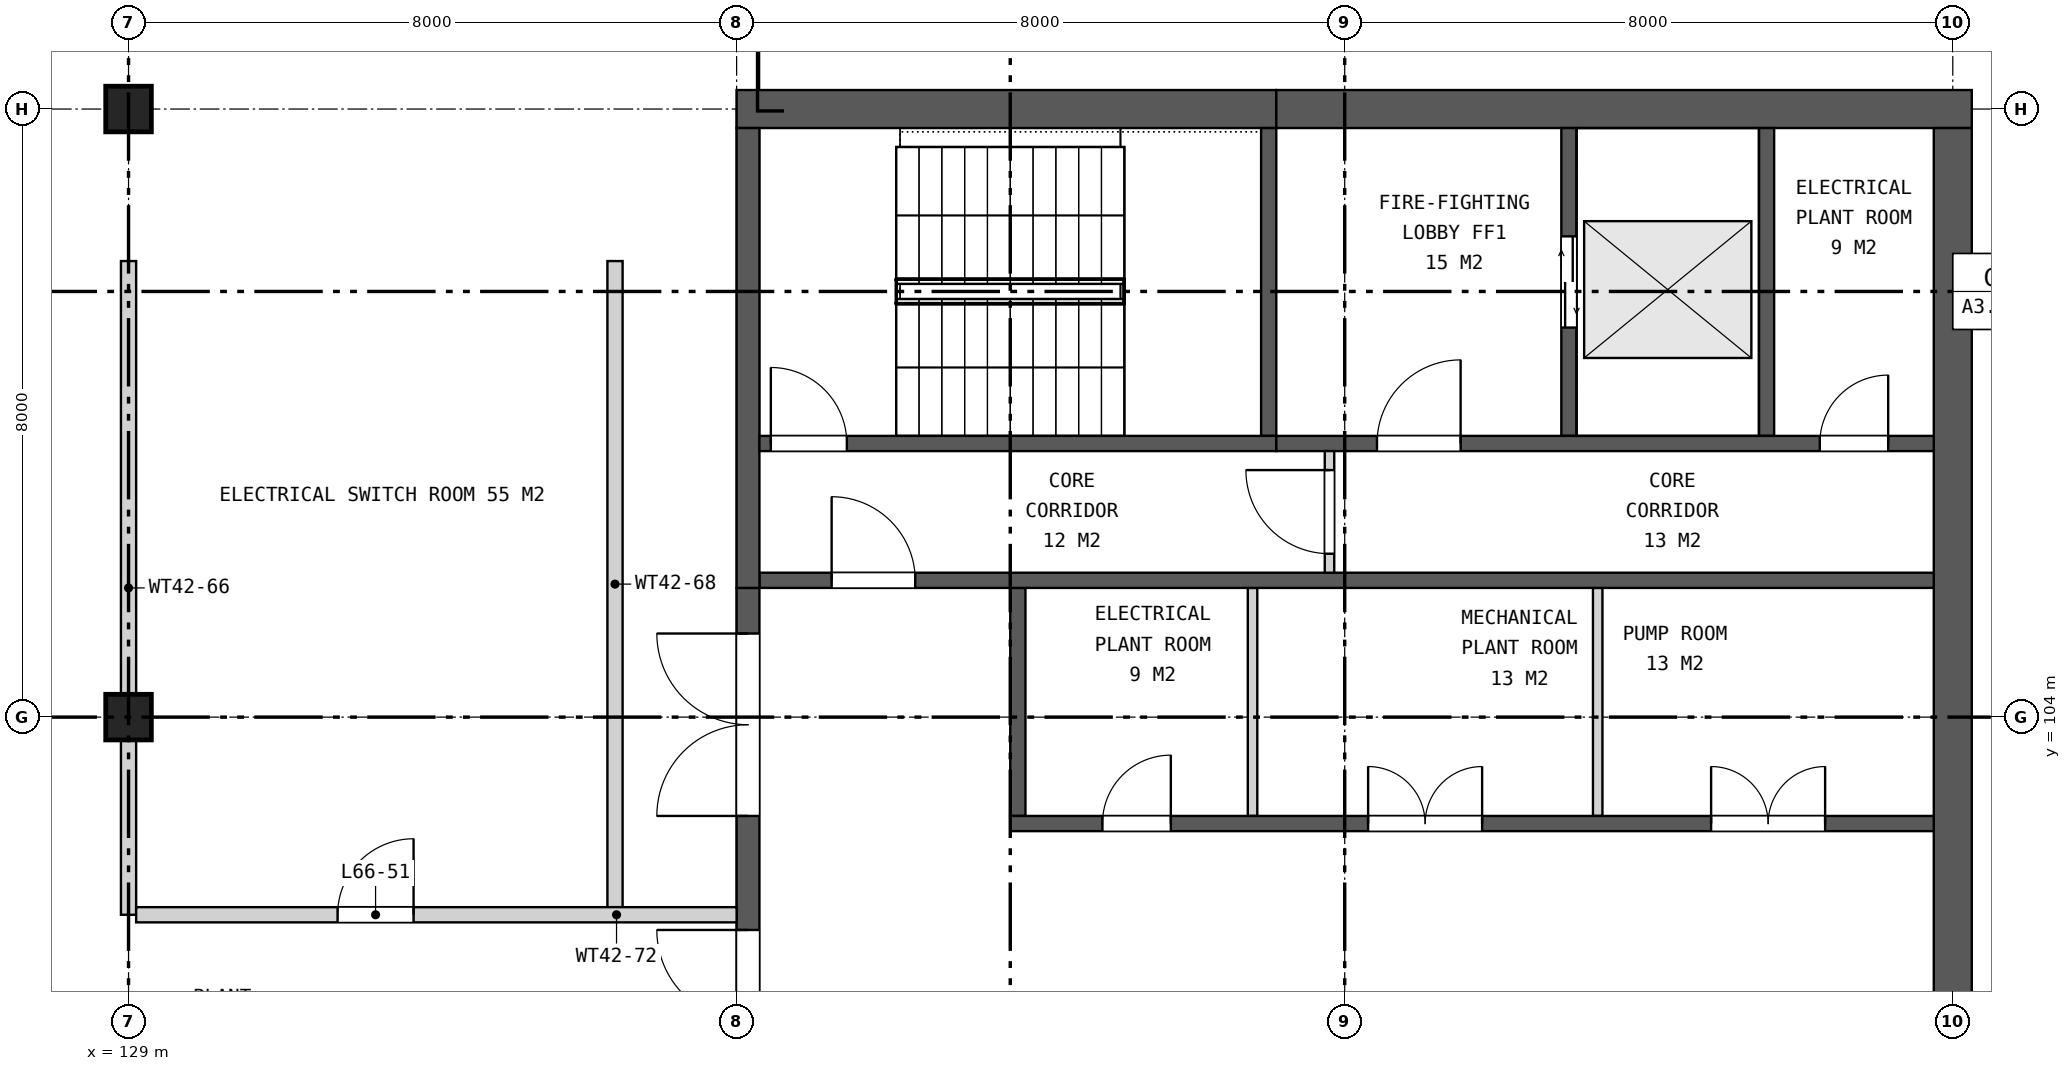
"""IFC4 building model, lengths in metres.
Left out: names, types, materials, properties, quantities, classifications, styles, units other than length and angle.
Written with IfcOpenShell. Run it as: python <this file> out.ifc"""

import sys

from ifc_helpers import new_model, si_unit, direction, frame, frame_2d, origin, origin_2d, place, context, subcontext, project, spatial, rectangle, extrude, element, fill, save


model = new_model("IFC4")
c1 = context("Model", 3, precision=1e-05, world=origin(), true_north=direction((0.0, 1.0)))
c2 = subcontext(c1, "Body", "Model", "MODEL_VIEW")
j1 = project(units=[si_unit("LENGTHUNIT", "METRE"), si_unit("PLANEANGLEUNIT", "RADIAN")], contexts=[c1])
p1 = place(None, origin())
s1 = spatial("IfcSite", under=j1, at=p1, CompositionType="ELEMENT")
p2 = place(p1, origin())
s2 = spatial("IfcBuilding", under=s1, at=p2, CompositionType="ELEMENT")
p3 = place(p2, frame((0.0, 0.0, 303.9)))
s3 = spatial("IfcBuildingStorey", under=s2, at=p3, CompositionType="ELEMENT", Elevation=303.9)
for number, where, z_axis, x_axis in (
    (1, (129.0, 104.0, 0.0), (0.0, 0.0, 1.0), (1.0, 0.0, 0.0)),
    (2, (129.0, 112.0, 0.0), (0.0, 0.0, 1.0), (1.0, 0.0, 0.0)),
):
    element("IfcColumn", number, at=place(p3, frame(where, z_axis=z_axis, x_axis=x_axis)), inside=s3, PredefinedType="COLUMN", context=c2, shape_type="SweptSolid", body=[
        extrude(rectangle(XDim=0.6, YDim=0.6, at=origin_2d()), origin(), (0.0, 0.0, 1.0), 7.4),
    ])
p4 = place(p3, frame((137.0, 112.0, 0.0), z_axis=(0.0, 0.0, 1.0), x_axis=(1.0, 0.0, 0.0)))
e3 = element("IfcWall", 3, at=p4, inside=s3, PredefinedType="SHEAR", context=c2, shape_type="SweptSolid", body=[
    extrude(rectangle(XDim=7.1, YDim=0.5, at=frame_2d((3.55, 0.0))), origin(), (0.0, 0.0, 1.0), 7.4),
])
p5 = place(p3, frame((144.1, 112.0, 0.0), z_axis=(0.0, 0.0, 1.0), x_axis=(1.0, 0.0, 0.0)))
e4 = element("IfcWall", 4, at=p5, inside=s3, PredefinedType="SHEAR", context=c2, shape_type="SweptSolid", body=[
    extrude(rectangle(XDim=9.15, YDim=0.5, at=frame_2d((4.575, 0.0))), origin(), (0.0, 0.0, 1.0), 7.4),
])
p6 = place(p3, frame((153.0, 88.25, 0.0), z_axis=(0.0, 0.0, 1.0), x_axis=(0.0, 1.0, 0.0)))
e5 = element("IfcWall", 5, at=p6, inside=s3, PredefinedType="SHEAR", context=c2, shape_type="SweptSolid", body=[
    extrude(rectangle(XDim=23.5, YDim=0.5, at=frame_2d((11.75, 0.0))), origin(), (0.0, 0.0, 1.0), 7.4),
])
p7 = place(p3, frame((137.15, 94.3, 0.0), z_axis=(0.0, 0.0, 1.0), x_axis=(0.0, 1.0, 0.0)))
e6 = element("IfcWall", 6, at=p7, inside=s3, PredefinedType="SHEAR", context=c2, shape_type="SweptSolid", body=[
    extrude(rectangle(XDim=11.4, YDim=0.3, at=frame_2d((5.7, 0.0))), origin(), (0.0, 0.0, 1.0), 7.4),
])
p8 = place(p7, frame((0.6, 0.0, 0.0)))
e7 = element("IfcOpeningElement", 7, at=p8, cuts=e6, PredefinedType="OPENING", context=c2, shape_type="SweptSolid", body=[
    extrude(rectangle(XDim=2.4, YDim=2.4, at=frame_2d((1.2, 1.2))), frame((0.0, 0.16, 0.0), z_axis=(0.0, -1.0, 0.0), x_axis=(1.0, 0.0, 0.0)), (0.0, 0.0, 1.0), 0.32),
])
p9 = place(p7, frame((4.5, 0.0, 0.0)))
e8 = element("IfcOpeningElement", 8, at=p9, cuts=e6, PredefinedType="OPENING", context=c2, shape_type="SweptSolid", body=[
    extrude(rectangle(XDim=2.4, YDim=2.4, at=frame_2d((1.2, 1.2))), frame((0.0, 0.16, 0.0), z_axis=(0.0, -1.0, 0.0), x_axis=(1.0, 0.0, 0.0)), (0.0, 0.0, 1.0), 0.32),
])
p10 = place(p7, frame((8.4, 0.0, 0.0)))
e9 = element("IfcOpeningElement", 9, at=p10, cuts=e6, PredefinedType="OPENING", context=c2, shape_type="SweptSolid", body=[
    extrude(rectangle(XDim=2.4, YDim=2.4, at=frame_2d((1.2, 1.2))), frame((0.0, 0.16, 0.0), z_axis=(0.0, -1.0, 0.0), x_axis=(1.0, 0.0, 0.0)), (0.0, 0.0, 1.0), 0.32),
])
p11 = place(p3, frame((140.7, 102.7, 0.0), z_axis=(0.0, 0.0, 1.0), x_axis=(0.0, 1.0, 0.0)))
e10 = element("IfcWall", 10, at=p11, inside=s3, PredefinedType="SHEAR", context=c2, shape_type="SweptSolid", body=[
    extrude(rectangle(XDim=3.0, YDim=0.2, at=frame_2d((1.5, 0.0))), origin(), (0.0, 0.0, 1.0), 7.4),
])
for number, where, z_axis, x_axis in (
    (11, (143.788, 102.7, 0.0), (0.0, 0.0, 1.0), (0.0, 1.0, 0.0)),
    (12, (148.329, 102.7, 0.0), (0.0, 0.0, 1.0), (0.0, 1.0, 0.0)),
):
    element("IfcWall", number, at=place(p3, frame(where, z_axis=z_axis, x_axis=x_axis)), inside=s3, PredefinedType="PARTITIONING", context=c2, shape_type="SweptSolid", body=[
        extrude(rectangle(XDim=3.0, YDim=0.125, at=frame_2d((1.5, 0.0))), origin(), (0.0, 0.0, 1.0), 7.4),
    ])
p12 = place(p3, frame((140.6, 102.6, 0.0), z_axis=(0.0, 0.0, 1.0), x_axis=(1.0, 0.0, 0.0)))
e13 = element("IfcWall", 13, at=p12, inside=s3, PredefinedType="SHEAR", context=c2, shape_type="SweptSolid", body=[
    extrude(rectangle(XDim=12.15, YDim=0.2, at=frame_2d((6.075, 0.0))), origin(), (0.0, 0.0, 1.0), 7.4),
])
p13 = place(p12, frame((1.212, 0.0, 0.0)))
e14 = element("IfcOpeningElement", 14, at=p13, cuts=e13, PredefinedType="OPENING", context=c2, shape_type="SweptSolid", body=[
    extrude(rectangle(XDim=0.9, YDim=2.1, at=frame_2d((0.45, 1.05))), frame((0.0, 0.11, 0.0), z_axis=(0.0, -1.0, 0.0), x_axis=(1.0, 0.0, 0.0)), (0.0, 0.0, 1.0), 0.22),
])
p14 = place(p12, frame((4.708, 0.0, 0.0)))
e15 = element("IfcOpeningElement", 15, at=p14, cuts=e13, PredefinedType="OPENING", context=c2, shape_type="SweptSolid", body=[
    extrude(rectangle(XDim=1.5, YDim=2.1, at=frame_2d((0.75, 1.05))), frame((0.0, 0.11, 0.0), z_axis=(0.0, -1.0, 0.0), x_axis=(1.0, 0.0, 0.0)), (0.0, 0.0, 1.0), 0.22),
])
p15 = place(p12, frame((9.22, 0.0, 0.0)))
e16 = element("IfcOpeningElement", 16, at=p15, cuts=e13, PredefinedType="OPENING", context=c2, shape_type="SweptSolid", body=[
    extrude(rectangle(XDim=1.5, YDim=2.1, at=frame_2d((0.75, 1.05))), frame((0.0, 0.11, 0.0), z_axis=(0.0, -1.0, 0.0), x_axis=(1.0, 0.0, 0.0)), (0.0, 0.0, 1.0), 0.22),
])
p16 = place(p3, frame((137.3, 105.8, 0.0), z_axis=(0.0, 0.0, 1.0), x_axis=(1.0, 0.0, 0.0)))
e17 = element("IfcWall", 17, at=p16, inside=s3, PredefinedType="SHEAR", context=c2, shape_type="SweptSolid", body=[
    extrude(rectangle(XDim=15.45, YDim=0.2, at=frame_2d((7.725, 0.0))), origin(), (0.0, 0.0, 1.0), 7.4),
])
p17 = place(p16, frame((0.95, 0.0, 0.0)))
e18 = element("IfcOpeningElement", 18, at=p17, cuts=e17, PredefinedType="OPENING", context=c2, shape_type="SweptSolid", body=[
    extrude(rectangle(XDim=1.1, YDim=2.1, at=frame_2d((0.55, 1.05))), frame((0.0, 0.11, 0.0), z_axis=(0.0, -1.0, 0.0), x_axis=(1.0, 0.0, 0.0)), (0.0, 0.0, 1.0), 0.22),
])
p18 = place(p3, frame((137.15, 105.7, 0.0), z_axis=(0.0, 0.0, 1.0), x_axis=(0.0, 1.0, 0.0)))
e19 = element("IfcWall", 19, at=p18, inside=s3, PredefinedType="SHEAR", context=c2, shape_type="SweptSolid", body=[
    extrude(rectangle(XDim=6.05, YDim=0.3, at=frame_2d((3.025, 0.0))), origin(), (0.0, 0.0, 1.0), 7.4),
])
p19 = place(p3, frame((144.0, 107.7, 0.0), z_axis=(0.0, 0.0, 1.0), x_axis=(0.0, 1.0, 0.0)))
e20 = element("IfcWall", 20, at=p19, inside=s3, PredefinedType="SHEAR", context=c2, shape_type="SweptSolid", body=[
    extrude(rectangle(XDim=4.05, YDim=0.2, at=frame_2d((2.025, 0.0))), origin(), (0.0, 0.0, 1.0), 7.4),
])
p20 = place(p3, frame((147.95, 107.7, 0.0), z_axis=(0.0, 0.0, 1.0), x_axis=(0.0, 1.0, 0.0)))
e21 = element("IfcWall", 21, at=p20, inside=s3, PredefinedType="SHEAR", context=c2, shape_type="SweptSolid", body=[
    extrude(rectangle(XDim=4.05, YDim=0.2, at=frame_2d((2.025, 0.0))), origin(), (0.0, 0.0, 1.0), 7.4),
])
p21 = place(p20, frame((1.425, 0.0, 0.0)))
e22 = element("IfcOpeningElement", 22, at=p21, cuts=e21, PredefinedType="OPENING", context=c2, shape_type="SweptSolid", body=[
    extrude(rectangle(XDim=1.2, YDim=2.1, at=frame_2d((0.6, 1.05))), frame((0.0, 0.11, 0.0), z_axis=(0.0, -1.0, 0.0), x_axis=(1.0, 0.0, 0.0)), (0.0, 0.0, 1.0), 0.22),
])
p22 = place(p3, frame((150.55, 107.7, 0.0), z_axis=(0.0, 0.0, 1.0), x_axis=(0.0, 1.0, 0.0)))
e23 = element("IfcWall", 23, at=p22, inside=s3, PredefinedType="SHEAR", context=c2, shape_type="SweptSolid", body=[
    extrude(rectangle(XDim=4.05, YDim=0.2, at=frame_2d((2.025, 0.0))), origin(), (0.0, 0.0, 1.0), 7.4),
])
p23 = place(p3, frame((137.3, 107.6, 0.0), z_axis=(0.0, 0.0, 1.0), x_axis=(1.0, 0.0, 0.0)))
e24 = element("IfcWall", 24, at=p23, inside=s3, PredefinedType="SHEAR", context=c2, shape_type="SweptSolid", body=[
    extrude(rectangle(XDim=6.8, YDim=0.2, at=frame_2d((3.4, 0.0))), origin(), (0.0, 0.0, 1.0), 7.4),
])
p24 = place(p23, frame((0.15, 0.0, 0.0)))
e25 = element("IfcOpeningElement", 25, at=p24, cuts=e24, PredefinedType="OPENING", context=c2, shape_type="SweptSolid", body=[
    extrude(rectangle(XDim=1.0, YDim=2.1, at=frame_2d((0.5, 1.05))), frame((0.0, 0.11, 0.0), z_axis=(0.0, -1.0, 0.0), x_axis=(1.0, 0.0, 0.0)), (0.0, 0.0, 1.0), 0.22),
])
p25 = place(p3, frame((144.1, 107.6, 0.0), z_axis=(0.0, 0.0, 1.0), x_axis=(1.0, 0.0, 0.0)))
e26 = element("IfcWall", 26, at=p25, inside=s3, PredefinedType="SHEAR", context=c2, shape_type="SweptSolid", body=[
    extrude(rectangle(XDim=8.65, YDim=0.2, at=frame_2d((4.325, 0.0))), origin(), (0.0, 0.0, 1.0), 7.4),
])
p26 = place(p25, frame((1.325, 0.0, 0.0)))
e27 = element("IfcOpeningElement", 27, at=p26, cuts=e26, PredefinedType="OPENING", context=c2, shape_type="SweptSolid", body=[
    extrude(rectangle(XDim=1.1, YDim=2.1, at=frame_2d((0.55, 1.05))), frame((0.0, 0.11, 0.0), z_axis=(0.0, -1.0, 0.0), x_axis=(1.0, 0.0, 0.0)), (0.0, 0.0, 1.0), 0.22),
])
p27 = place(p25, frame((7.15, 0.0, 0.0)))
e28 = element("IfcOpeningElement", 28, at=p27, cuts=e26, PredefinedType="OPENING", context=c2, shape_type="SweptSolid", body=[
    extrude(rectangle(XDim=0.9, YDim=2.1, at=frame_2d((0.45, 1.05))), frame((0.0, 0.11, 0.0), z_axis=(0.0, -1.0, 0.0), x_axis=(1.0, 0.0, 0.0)), (0.0, 0.0, 1.0), 0.22),
])
p28 = place(p3, frame((144.8, 105.9, 0.0), z_axis=(0.0, 0.0, 1.0), x_axis=(0.0, 1.0, 0.0)))
e29 = element("IfcWall", 29, at=p28, inside=s3, PredefinedType="PARTITIONING", context=c2, shape_type="SweptSolid", body=[
    extrude(rectangle(XDim=1.6, YDim=0.125, at=frame_2d((0.8, 0.0))), origin(), (0.0, 0.0, 1.0), 7.4),
])
p29 = place(p28, frame((0.25, 0.0, 0.0)))
e30 = element("IfcOpeningElement", 30, at=p29, cuts=e29, PredefinedType="OPENING", context=c2, shape_type="SweptSolid", body=[
    extrude(rectangle(XDim=1.1, YDim=2.1, at=frame_2d((0.55, 1.05))), frame((0.0, 0.073, 0.0), z_axis=(0.0, -1.0, 0.0), x_axis=(1.0, 0.0, 0.0)), (0.0, 0.0, 1.0), 0.145),
])
p30 = place(p3, frame((129.0, 101.4, 0.0), z_axis=(0.0, 0.0, 1.0), x_axis=(0.0, 1.0, 0.0)))
e31 = element("IfcWall", 31, at=p30, inside=s3, PredefinedType="SOLIDWALL", context=c2, shape_type="SweptSolid", body=[
    extrude(rectangle(XDim=8.6, YDim=0.2, at=frame_2d((4.3, 0.0))), origin(), (0.0, 0.0, 1.0), 6.643),
])
p31 = place(p3, frame((135.4, 101.5, 0.0), z_axis=(0.0, 0.0, 1.0), x_axis=(0.0, 1.0, 0.0)))
e32 = element("IfcWall", 32, at=p31, inside=s3, PredefinedType="SOLIDWALL", context=c2, shape_type="SweptSolid", body=[
    extrude(rectangle(XDim=8.5, YDim=0.2, at=frame_2d((4.25, 0.0))), origin(), (0.0, 0.0, 1.0), 6.643),
])
p32 = place(p3, frame((129.1, 101.4, 0.0), z_axis=(0.0, 0.0, 1.0), x_axis=(1.0, 0.0, 0.0)))
e33 = element("IfcWall", 33, at=p32, inside=s3, PredefinedType="SOLIDWALL", context=c2, shape_type="SweptSolid", body=[
    extrude(rectangle(XDim=7.9, YDim=0.2, at=frame_2d((3.95, 0.0))), origin(), (0.0, 0.0, 1.0), 6.643),
])
p33 = place(p32, frame((2.65, 0.0, 0.0)))
e34 = element("IfcOpeningElement", 34, at=p33, cuts=e33, PredefinedType="OPENING", context=c2, shape_type="SweptSolid", body=[
    extrude(rectangle(XDim=1.0, YDim=2.1, at=frame_2d((0.5, 1.05))), frame((0.0, 0.11, 0.0), z_axis=(0.0, -1.0, 0.0), x_axis=(1.0, 0.0, 0.0)), (0.0, 0.0, 1.0), 0.22),
])
p34 = place(p9, origin())
e35 = element("IfcDoor", 35, at=p34, inside=s3, OperationType="DOUBLE_DOOR_SINGLE_SWING", PredefinedType="DOOR", context=c2, shape_type="SweptSolid", body=[
    extrude(rectangle(XDim=2.4, YDim=2.4, at=frame_2d((1.2, 1.2))), frame((0.0, 0.025, 0.0), z_axis=(0.0, -1.0, 0.0), x_axis=(1.0, 0.0, 0.0)), (0.0, 0.0, 1.0), 0.05),
])
fill(e8, e35)
p35 = place(p10, origin())
e36 = element("IfcDoor", 36, at=p35, inside=s3, OperationType="DOUBLE_DOOR_SINGLE_SWING", PredefinedType="DOOR", context=c2, shape_type="SweptSolid", body=[
    extrude(rectangle(XDim=2.4, YDim=2.4, at=frame_2d((1.2, 1.2))), frame((0.0, 0.025, 0.0), z_axis=(0.0, -1.0, 0.0), x_axis=(1.0, 0.0, 0.0)), (0.0, 0.0, 1.0), 0.05),
])
fill(e9, e36)
p36 = place(p13, origin())
e37 = element("IfcDoor", 37, at=p36, inside=s3, OperationType="SINGLE_SWING_RIGHT", PredefinedType="DOOR", context=c2, shape_type="SweptSolid", body=[
    extrude(rectangle(XDim=0.9, YDim=2.1, at=frame_2d((0.45, 1.05))), frame((0.0, 0.025, 0.0), z_axis=(0.0, -1.0, 0.0), x_axis=(1.0, 0.0, 0.0)), (0.0, 0.0, 1.0), 0.05),
])
fill(e14, e37)
p37 = place(p14, origin())
e38 = element("IfcDoor", 38, at=p37, inside=s3, OperationType="DOUBLE_DOOR_SINGLE_SWING", PredefinedType="DOOR", context=c2, shape_type="SweptSolid", body=[
    extrude(rectangle(XDim=1.5, YDim=2.1, at=frame_2d((0.75, 1.05))), frame((0.0, 0.025, 0.0), z_axis=(0.0, -1.0, 0.0), x_axis=(1.0, 0.0, 0.0)), (0.0, 0.0, 1.0), 0.05),
])
fill(e15, e38)
p38 = place(p15, origin())
e39 = element("IfcDoor", 39, at=p38, inside=s3, OperationType="DOUBLE_DOOR_SINGLE_SWING", PredefinedType="DOOR", context=c2, shape_type="SweptSolid", body=[
    extrude(rectangle(XDim=1.5, YDim=2.1, at=frame_2d((0.75, 1.05))), frame((0.0, 0.025, 0.0), z_axis=(0.0, -1.0, 0.0), x_axis=(1.0, 0.0, 0.0)), (0.0, 0.0, 1.0), 0.05),
])
fill(e16, e39)
p39 = place(p17, origin())
e40 = element("IfcDoor", 40, at=p39, inside=s3, OperationType="SINGLE_SWING_LEFT", PredefinedType="DOOR", context=c2, shape_type="SweptSolid", body=[
    extrude(rectangle(XDim=1.1, YDim=2.1, at=frame_2d((0.55, 1.05))), frame((0.0, 0.025, 0.0), z_axis=(0.0, -1.0, 0.0), x_axis=(1.0, 0.0, 0.0)), (0.0, 0.0, 1.0), 0.05),
])
fill(e18, e40)
p40 = place(p21, origin())
e41 = element("IfcDoor", 41, at=p40, inside=s3, OperationType="DOUBLE_DOOR_SLIDING", PredefinedType="DOOR", context=c2, shape_type="SweptSolid", body=[
    extrude(rectangle(XDim=1.2, YDim=2.1, at=frame_2d((0.6, 1.05))), frame((0.0, 0.025, 0.0), z_axis=(0.0, -1.0, 0.0), x_axis=(1.0, 0.0, 0.0)), (0.0, 0.0, 1.0), 0.05),
])
fill(e22, e41)
p41 = place(p24, origin())
e42 = element("IfcDoor", 42, at=p41, inside=s3, OperationType="SINGLE_SWING_LEFT", PredefinedType="DOOR", context=c2, shape_type="SweptSolid", body=[
    extrude(rectangle(XDim=1.0, YDim=2.1, at=frame_2d((0.5, 1.05))), frame((0.0, 0.025, 0.0), z_axis=(0.0, -1.0, 0.0), x_axis=(1.0, 0.0, 0.0)), (0.0, 0.0, 1.0), 0.05),
])
fill(e25, e42)
p42 = place(p26, origin())
e43 = element("IfcDoor", 43, at=p42, inside=s3, OperationType="SINGLE_SWING_RIGHT", PredefinedType="DOOR", context=c2, shape_type="SweptSolid", body=[
    extrude(rectangle(XDim=1.1, YDim=2.1, at=frame_2d((0.55, 1.05))), frame((0.0, 0.025, 0.0), z_axis=(0.0, -1.0, 0.0), x_axis=(1.0, 0.0, 0.0)), (0.0, 0.0, 1.0), 0.05),
])
fill(e27, e43)
p43 = place(p27, origin())
e44 = element("IfcDoor", 44, at=p43, inside=s3, OperationType="SINGLE_SWING_RIGHT", PredefinedType="DOOR", context=c2, shape_type="SweptSolid", body=[
    extrude(rectangle(XDim=0.9, YDim=2.1, at=frame_2d((0.45, 1.05))), frame((0.0, 0.025, 0.0), z_axis=(0.0, -1.0, 0.0), x_axis=(1.0, 0.0, 0.0)), (0.0, 0.0, 1.0), 0.05),
])
fill(e28, e44)
p44 = place(p29, origin())
e45 = element("IfcDoor", 45, at=p44, inside=s3, OperationType="SINGLE_SWING_RIGHT", PredefinedType="DOOR", context=c2, shape_type="SweptSolid", body=[
    extrude(rectangle(XDim=1.1, YDim=2.1, at=frame_2d((0.55, 1.05))), frame((0.0, 0.025, 0.0), z_axis=(0.0, -1.0, 0.0), x_axis=(1.0, 0.0, 0.0)), (0.0, 0.0, 1.0), 0.05),
])
fill(e30, e45)
p45 = place(p33, origin())
e46 = element("IfcDoor", 46, at=p45, inside=s3, OperationType="SINGLE_SWING_RIGHT", PredefinedType="DOOR", context=c2, shape_type="SweptSolid", body=[
    extrude(rectangle(XDim=1.0, YDim=2.1, at=frame_2d((0.5, 1.05))), frame((0.0, 0.025, 0.0), z_axis=(0.0, -1.0, 0.0), x_axis=(1.0, 0.0, 0.0)), (0.0, 0.0, 1.0), 0.05),
])
fill(e34, e46)
save(model, sys.argv[1])
